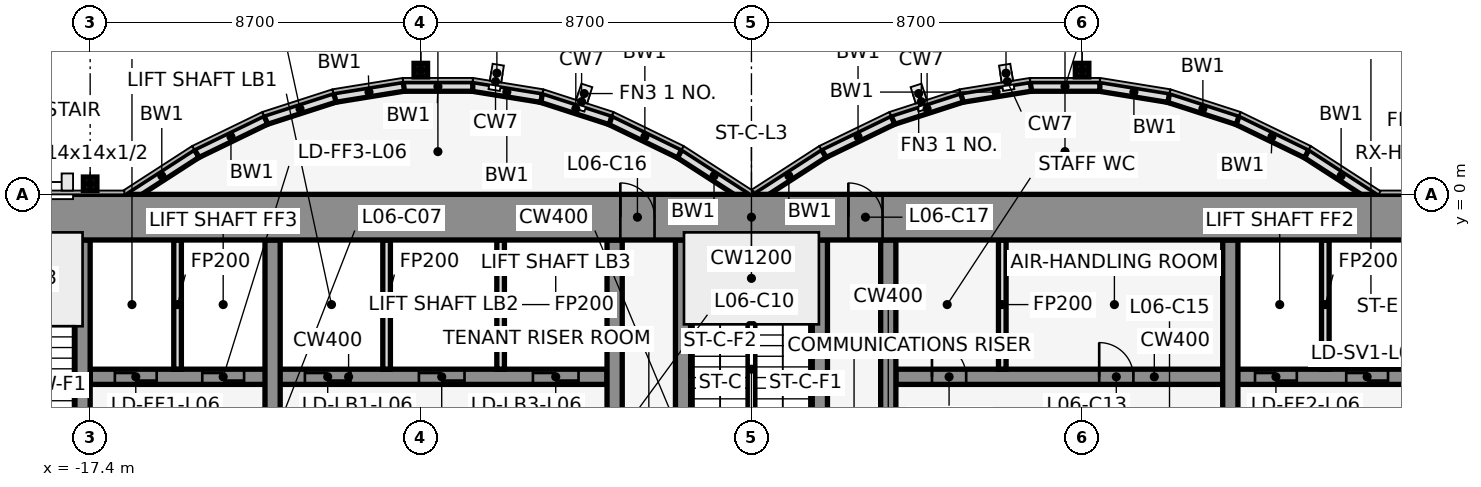
"""IFC4 building model, lengths in metres.
Left out: names, types, materials, properties, quantities, classifications, styles, units other than length and angle.
Written with IfcOpenShell. Run it as: python <this file> out.ifc"""

import sys

from ifc_helpers import new_model, si_unit, direction, frame, frame_2d, origin, origin_2d, place, context, subcontext, project, spatial, rectangle, hollow_rectangle, extrude, element, fill, save


model = new_model("IFC4")
c1 = context("Model", 3, precision=1e-05, world=origin(), true_north=direction((0.0, 1.0)))
c2 = subcontext(c1, "Body", "Model", "MODEL_VIEW")
j1 = project(units=[si_unit("LENGTHUNIT", "METRE"), si_unit("PLANEANGLEUNIT", "RADIAN")], contexts=[c1])
p1 = place(None, origin())
s1 = spatial("IfcSite", under=j1, at=p1, CompositionType="ELEMENT")
p2 = place(p1, origin())
s2 = spatial("IfcBuilding", under=s1, at=p2, CompositionType="ELEMENT")
p3 = place(p2, frame((0.0, 0.0, 35.0)))
s3 = spatial("IfcBuildingStorey", under=s2, at=p3, CompositionType="ELEMENT", Elevation=35.0)
for number, where, z_axis, x_axis in (
    (1, (-8.7, 3.269, 0.0), (0.0, 0.0, 1.0), (1.0, 0.0, 0.0)),
    (2, (-17.4, 0.278, 0.0), (0.0, 0.0, 1.0), (1.0, 0.0, 0.0)),
    (3, (8.7, 3.269, 0.0), (0.0, 0.0, 1.0), (1.0, 0.0, 0.0)),
):
    element("IfcColumn", number, at=place(p3, frame(where, z_axis=z_axis, x_axis=x_axis)), inside=s3, PredefinedType="COLUMN", context=c2, shape_type="SweptSolid", body=[
        extrude(hollow_rectangle(XDim=0.356, YDim=0.356, WallThickness=0.012, at=origin_2d()), origin(), (0.0, 0.0, 1.0), 4.5),
    ])
p4 = place(p3, frame((16.432, -0.105, 0.0), z_axis=(0.0, 0.0, 1.0), x_axis=(-0.83981312244, 0.542875602121, 0.0)))
e4 = element("IfcWall", 4, at=p4, inside=s3, PredefinedType="STANDARD", context=c2, shape_type="SweptSolid", body=[
    extrude(rectangle(XDim=2.183, YDim=0.25, at=frame_2d((1.091, 0.0))), origin(), (0.0, 0.0, 1.0), 4.35),
])
p5 = place(p3, frame((14.612, 1.073, 0.0), z_axis=(0.0, 0.0, 1.0), x_axis=(-0.89982408427, 0.436252928206, 0.0)))
e5 = element("IfcWall", 5, at=p5, inside=s3, PredefinedType="STANDARD", context=c2, shape_type="SweptSolid", body=[
    extrude(rectangle(XDim=2.038, YDim=0.25, at=frame_2d((1.019, 0.0))), origin(), (0.0, 0.0, 1.0), 4.35),
])
p6 = place(p3, frame((12.795, 1.955, 0.0), z_axis=(0.0, 0.0, 1.0), x_axis=(-0.951495806175, 0.307661714928, 0.0)))
e6 = element("IfcWall", 6, at=p6, inside=s3, PredefinedType="STANDARD", context=c2, shape_type="SweptSolid", body=[
    extrude(rectangle(XDim=1.927, YDim=0.25, at=frame_2d((0.963, 0.0))), origin(), (0.0, 0.0, 1.0), 4.35),
])
p7 = place(p3, frame((10.98, 2.543, 0.0), z_axis=(0.0, 0.0, 1.0), x_axis=(-0.987181718931, 0.159600293885, 0.0)))
e7 = element("IfcWall", 7, at=p7, inside=s3, PredefinedType="STANDARD", context=c2, shape_type="SweptSolid", body=[
    extrude(rectangle(XDim=1.857, YDim=0.25, at=frame_2d((0.929, 0.0))), origin(), (0.0, 0.0, 1.0), 4.35),
])
p8 = place(p3, frame((9.167, 2.838, 0.0), z_axis=(0.0, 0.0, 1.0), x_axis=(-1.0, 0.0, 0.0)))
e8 = element("IfcWall", 8, at=p8, inside=s3, PredefinedType="STANDARD", context=c2, shape_type="SweptSolid", body=[
    extrude(rectangle(XDim=1.833, YDim=0.25, at=frame_2d((0.917, 0.0))), origin(), (0.0, 0.0, 1.0), 4.35),
])
p9 = place(p3, frame((7.353, 2.84, 0.0), z_axis=(0.0, 0.0, 1.0), x_axis=(-0.987181718931, -0.159600293885, 0.0)))
e9 = element("IfcWall", 9, at=p9, inside=s3, PredefinedType="STANDARD", context=c2, shape_type="SweptSolid", body=[
    extrude(rectangle(XDim=1.857, YDim=0.25, at=frame_2d((0.929, 0.0))), origin(), (0.0, 0.0, 1.0), 4.35),
])
p10 = place(p3, frame((5.538, 2.548, 0.0), z_axis=(0.0, 0.0, 1.0), x_axis=(-0.951495806175, -0.307661714928, 0.0)))
e10 = element("IfcWall", 10, at=p10, inside=s3, PredefinedType="STANDARD", context=c2, shape_type="SweptSolid", body=[
    extrude(rectangle(XDim=1.927, YDim=0.25, at=frame_2d((0.963, 0.0))), origin(), (0.0, 0.0, 1.0), 4.35),
])
p11 = place(p3, frame((3.721, 1.962, 0.0), z_axis=(0.0, 0.0, 1.0), x_axis=(-0.89982408427, -0.436252928206, 0.0)))
e11 = element("IfcWall", 11, at=p11, inside=s3, PredefinedType="STANDARD", context=c2, shape_type="SweptSolid", body=[
    extrude(rectangle(XDim=2.038, YDim=0.25, at=frame_2d((1.019, 0.0))), origin(), (0.0, 0.0, 1.0), 4.35),
])
for number, where, z_axis, x_axis in (
    (12, (1.901, 1.08, 0.0), (0.0, 0.0, 1.0), (-0.84, -0.543, 0.0)),
    (13, (-0.068, -0.105, 0.0), (0.0, 0.0, 1.0), (-0.84, 0.543, 0.0)),
):
    element("IfcWall", number, at=place(p3, frame(where, z_axis=z_axis, x_axis=x_axis)), inside=s3, PredefinedType="STANDARD", context=c2, shape_type="SweptSolid", body=[
        extrude(rectangle(XDim=2.183, YDim=0.25, at=frame_2d((1.091, 0.0))), origin(), (0.0, 0.0, 1.0), 4.35),
    ])
p12 = place(p3, frame((-1.888, 1.073, 0.0), z_axis=(0.0, 0.0, 1.0), x_axis=(-0.89982408427, 0.436252928206, 0.0)))
e14 = element("IfcWall", 14, at=p12, inside=s3, PredefinedType="STANDARD", context=c2, shape_type="SweptSolid", body=[
    extrude(rectangle(XDim=2.038, YDim=0.25, at=frame_2d((1.019, 0.0))), origin(), (0.0, 0.0, 1.0), 4.35),
])
p13 = place(p3, frame((-3.705, 1.955, 0.0), z_axis=(0.0, 0.0, 1.0), x_axis=(-0.951495806175, 0.307661714928, 0.0)))
e15 = element("IfcWall", 15, at=p13, inside=s3, PredefinedType="STANDARD", context=c2, shape_type="SweptSolid", body=[
    extrude(rectangle(XDim=1.927, YDim=0.25, at=frame_2d((0.963, 0.0))), origin(), (0.0, 0.0, 1.0), 4.35),
])
p14 = place(p3, frame((-5.52, 2.543, 0.0), z_axis=(0.0, 0.0, 1.0), x_axis=(-0.987181718931, 0.159600293885, 0.0)))
e16 = element("IfcWall", 16, at=p14, inside=s3, PredefinedType="STANDARD", context=c2, shape_type="SweptSolid", body=[
    extrude(rectangle(XDim=1.857, YDim=0.25, at=frame_2d((0.929, 0.0))), origin(), (0.0, 0.0, 1.0), 4.35),
])
p15 = place(p3, frame((-7.333, 2.838, 0.0), z_axis=(0.0, 0.0, 1.0), x_axis=(-1.0, 0.0, 0.0)))
e17 = element("IfcWall", 17, at=p15, inside=s3, PredefinedType="STANDARD", context=c2, shape_type="SweptSolid", body=[
    extrude(rectangle(XDim=1.833, YDim=0.25, at=frame_2d((0.917, 0.0))), origin(), (0.0, 0.0, 1.0), 4.35),
])
p16 = place(p3, frame((-9.147, 2.84, 0.0), z_axis=(0.0, 0.0, 1.0), x_axis=(-0.987181718931, -0.159600293885, 0.0)))
e18 = element("IfcWall", 18, at=p16, inside=s3, PredefinedType="STANDARD", context=c2, shape_type="SweptSolid", body=[
    extrude(rectangle(XDim=1.857, YDim=0.25, at=frame_2d((0.929, 0.0))), origin(), (0.0, 0.0, 1.0), 4.35),
])
p17 = place(p3, frame((-10.962, 2.548, 0.0), z_axis=(0.0, 0.0, 1.0), x_axis=(-0.951495806175, -0.307661714928, 0.0)))
e19 = element("IfcWall", 19, at=p17, inside=s3, PredefinedType="STANDARD", context=c2, shape_type="SweptSolid", body=[
    extrude(rectangle(XDim=1.927, YDim=0.25, at=frame_2d((0.963, 0.0))), origin(), (0.0, 0.0, 1.0), 4.35),
])
p18 = place(p3, frame((-12.779, 1.962, 0.0), z_axis=(0.0, 0.0, 1.0), x_axis=(-0.89982408427, -0.436252928206, 0.0)))
e20 = element("IfcWall", 20, at=p18, inside=s3, PredefinedType="STANDARD", context=c2, shape_type="SweptSolid", body=[
    extrude(rectangle(XDim=2.038, YDim=0.25, at=frame_2d((1.019, 0.0))), origin(), (0.0, 0.0, 1.0), 4.35),
])
p19 = place(p3, frame((-14.599, 1.08, 0.0), z_axis=(0.0, 0.0, 1.0), x_axis=(-0.83981312244, -0.542875602121, 0.0)))
e21 = element("IfcWall", 21, at=p19, inside=s3, PredefinedType="STANDARD", context=c2, shape_type="SweptSolid", body=[
    extrude(rectangle(XDim=2.183, YDim=0.25, at=frame_2d((1.091, 0.0))), origin(), (0.0, 0.0, 1.0), 4.35),
])
p20 = place(p3, frame((-17.4, -4.8, 0.0), z_axis=(0.0, 0.0, 1.0), x_axis=(1.0, 0.0, 0.0)))
e22 = element("IfcWall", 22, at=p20, inside=s3, PredefinedType="SHEAR", context=c2, shape_type="SweptSolid", body=[
    extrude(rectangle(XDim=13.6, YDim=0.4, at=frame_2d((6.8, 0.0))), origin(), (0.0, 0.0, 1.0), 4.5),
])
p21 = place(p20, frame((0.65, 0.0, 0.0)))
e23 = element("IfcOpeningElement", 23, at=p21, cuts=e22, PredefinedType="OPENING", context=c2, shape_type="SweptSolid", body=[
    extrude(rectangle(XDim=1.1, YDim=2.1, at=frame_2d((0.55, 1.05))), frame((0.0, 0.212, 0.0), z_axis=(0.0, -1.0, 0.0), x_axis=(1.0, 0.0, 0.0)), (0.0, 0.0, 1.0), 0.424),
])
p22 = place(p20, frame((2.95, 0.0, 0.0)))
e24 = element("IfcOpeningElement", 24, at=p22, cuts=e22, PredefinedType="OPENING", context=c2, shape_type="SweptSolid", body=[
    extrude(rectangle(XDim=1.1, YDim=2.1, at=frame_2d((0.55, 1.05))), frame((0.0, 0.212, 0.0), z_axis=(0.0, -1.0, 0.0), x_axis=(1.0, 0.0, 0.0)), (0.0, 0.0, 1.0), 0.424),
])
p23 = place(p20, frame((5.65, 0.0, 0.0)))
e25 = element("IfcOpeningElement", 25, at=p23, cuts=e22, PredefinedType="OPENING", context=c2, shape_type="SweptSolid", body=[
    extrude(rectangle(XDim=1.2, YDim=2.1, at=frame_2d((0.6, 1.05))), frame((0.0, 0.212, 0.0), z_axis=(0.0, -1.0, 0.0), x_axis=(1.0, 0.0, 0.0)), (0.0, 0.0, 1.0), 0.424),
])
p24 = place(p20, frame((8.65, 0.0, 0.0)))
e26 = element("IfcOpeningElement", 26, at=p24, cuts=e22, PredefinedType="OPENING", context=c2, shape_type="SweptSolid", body=[
    extrude(rectangle(XDim=1.2, YDim=2.1, at=frame_2d((0.6, 1.05))), frame((0.0, 0.212, 0.0), z_axis=(0.0, -1.0, 0.0), x_axis=(1.0, 0.0, 0.0)), (0.0, 0.0, 1.0), 0.424),
])
p25 = place(p20, frame((11.65, 0.0, 0.0)))
e27 = element("IfcOpeningElement", 27, at=p25, cuts=e22, PredefinedType="OPENING", context=c2, shape_type="SweptSolid", body=[
    extrude(rectangle(XDim=1.2, YDim=2.1, at=frame_2d((0.6, 1.05))), frame((0.0, 0.212, 0.0), z_axis=(0.0, -1.0, 0.0), x_axis=(1.0, 0.0, 0.0)), (0.0, 0.0, 1.0), 0.424),
])
p26 = place(p3, frame((3.8, -4.8, 0.0), z_axis=(0.0, 0.0, 1.0), x_axis=(1.0, 0.0, 0.0)))
e28 = element("IfcWall", 28, at=p26, inside=s3, PredefinedType="SHEAR", context=c2, shape_type="SweptSolid", body=[
    extrude(rectangle(XDim=13.6, YDim=0.4, at=frame_2d((6.8, 0.0))), origin(), (0.0, 0.0, 1.0), 4.5),
])
p27 = place(p26, frame((9.45, 0.0, 0.0)))
e29 = element("IfcOpeningElement", 29, at=p27, cuts=e28, PredefinedType="OPENING", context=c2, shape_type="SweptSolid", body=[
    extrude(rectangle(XDim=1.1, YDim=2.1, at=frame_2d((0.55, 1.05))), frame((0.0, 0.212, 0.0), z_axis=(0.0, -1.0, 0.0), x_axis=(1.0, 0.0, 0.0)), (0.0, 0.0, 1.0), 0.424),
])
p28 = place(p26, frame((11.85, 0.0, 0.0)))
e30 = element("IfcOpeningElement", 30, at=p28, cuts=e28, PredefinedType="OPENING", context=c2, shape_type="SweptSolid", body=[
    extrude(rectangle(XDim=1.1, YDim=2.1, at=frame_2d((0.55, 1.05))), frame((0.0, 0.212, 0.0), z_axis=(0.0, -1.0, 0.0), x_axis=(1.0, 0.0, 0.0)), (0.0, 0.0, 1.0), 0.424),
])
p29 = place(p26, frame((0.95, 0.0, 0.0)))
e31 = element("IfcOpeningElement", 31, at=p29, cuts=e28, PredefinedType="OPENING", context=c2, shape_type="SweptSolid", body=[
    extrude(rectangle(XDim=0.9, YDim=2.1, at=frame_2d((0.45, 1.05))), frame((0.0, 0.212, 0.0), z_axis=(0.0, -1.0, 0.0), x_axis=(1.0, 0.0, 0.0)), (0.0, 0.0, 1.0), 0.424),
])
p30 = place(p26, frame((5.35, 0.0, 0.0)))
e32 = element("IfcOpeningElement", 32, at=p30, cuts=e28, PredefinedType="OPENING", context=c2, shape_type="SweptSolid", body=[
    extrude(rectangle(XDim=0.9, YDim=2.1, at=frame_2d((0.45, 1.05))), frame((0.0, 0.212, 0.0), z_axis=(0.0, -1.0, 0.0), x_axis=(1.0, 0.0, 0.0)), (0.0, 0.0, 1.0), 0.424),
])
p31 = place(p3, frame((-17.6, -11.8, 0.0), z_axis=(0.0, 0.0, 1.0), x_axis=(0.0, 1.0, 0.0)))
e33 = element("IfcWall", 33, at=p31, inside=s3, PredefinedType="SHEAR", context=c2, shape_type="SweptSolid", body=[
    extrude(rectangle(XDim=10.6, YDim=0.4, at=frame_2d((5.3, 0.0))), origin(), (0.0, 0.0, 1.0), 4.5),
])
p32 = place(p31, frame((1.25, 0.0, 0.0)))
e34 = element("IfcOpeningElement", 34, at=p32, cuts=e33, PredefinedType="OPENING", context=c2, shape_type="SweptSolid", body=[
    extrude(rectangle(XDim=1.1, YDim=2.1, at=frame_2d((0.55, 1.05))), frame((0.0, 0.212, 0.0), z_axis=(0.0, -1.0, 0.0), x_axis=(1.0, 0.0, 0.0)), (0.0, 0.0, 1.0), 0.424),
])
p33 = place(p31, frame((3.95, 0.0, 0.0)))
e35 = element("IfcOpeningElement", 35, at=p33, cuts=e33, PredefinedType="OPENING", context=c2, shape_type="SweptSolid", body=[
    extrude(rectangle(XDim=1.1, YDim=2.1, at=frame_2d((0.55, 1.05))), frame((0.0, 0.212, 0.0), z_axis=(0.0, -1.0, 0.0), x_axis=(1.0, 0.0, 0.0)), (0.0, 0.0, 1.0), 0.424),
])
p34 = place(p3, frame((-15.1, -4.6, 0.0), z_axis=(0.0, 0.0, 1.0), x_axis=(0.0, 1.0, 0.0)))
e36 = element("IfcWall", 36, at=p34, inside=s3, PredefinedType="PARTITIONING", context=c2, shape_type="SweptSolid", body=[
    extrude(rectangle(XDim=3.4, YDim=0.2, at=frame_2d((1.7, 0.0))), origin(), (0.0, 0.0, 1.0), 3.36),
])
p35 = place(p3, frame((-12.6, -11.8, 0.0), z_axis=(0.0, 0.0, 1.0), x_axis=(0.0, 1.0, 0.0)))
e37 = element("IfcWall", 37, at=p35, inside=s3, PredefinedType="SHEAR", context=c2, shape_type="SweptSolid", body=[
    extrude(rectangle(XDim=10.6, YDim=0.4, at=frame_2d((5.3, 0.0))), origin(), (0.0, 0.0, 1.0), 4.5),
])
p36 = place(p35, frame((4.75, 0.0, 0.0)))
e38 = element("IfcOpeningElement", 38, at=p36, cuts=e37, PredefinedType="OPENING", context=c2, shape_type="SweptSolid", body=[
    extrude(rectangle(XDim=1.1, YDim=2.1, at=frame_2d((0.55, 1.05))), frame((0.0, 0.212, 0.0), z_axis=(0.0, -1.0, 0.0), x_axis=(1.0, 0.0, 0.0)), (0.0, 0.0, 1.0), 0.424),
])
for number, where, z_axis, x_axis in (
    (39, (-9.6, -4.6, 0.0), (0.0, 0.0, 1.0), (0.0, 1.0, 0.0)),
    (40, (-6.6, -4.6, 0.0), (0.0, 0.0, 1.0), (0.0, 1.0, 0.0)),
):
    element("IfcWall", number, at=place(p3, frame(where, z_axis=z_axis, x_axis=x_axis)), inside=s3, PredefinedType="PARTITIONING", context=c2, shape_type="SweptSolid", body=[
        extrude(rectangle(XDim=3.4, YDim=0.2, at=frame_2d((1.7, 0.0))), origin(), (0.0, 0.0, 1.0), 3.36),
    ])
p37 = place(p3, frame((-3.6, -11.8, 0.0), z_axis=(0.0, 0.0, 1.0), x_axis=(0.0, 1.0, 0.0)))
e41 = element("IfcWall", 41, at=p37, inside=s3, PredefinedType="SHEAR", context=c2, shape_type="SweptSolid", body=[
    extrude(rectangle(XDim=10.6, YDim=0.4, at=frame_2d((5.3, 0.0))), origin(), (0.0, 0.0, 1.0), 4.5),
])
p38 = place(p37, frame((4.85, 0.0, 0.0)))
e42 = element("IfcOpeningElement", 42, at=p38, cuts=e41, PredefinedType="OPENING", context=c2, shape_type="SweptSolid", body=[
    extrude(rectangle(XDim=0.9, YDim=2.1, at=frame_2d((0.45, 1.05))), frame((0.0, 0.212, 0.0), z_axis=(0.0, -1.0, 0.0), x_axis=(1.0, 0.0, 0.0)), (0.0, 0.0, 1.0), 0.424),
])
for number, where, z_axis, x_axis in (
    (43, (-1.8, -11.8, 0.0), (0.0, 0.0, 1.0), (0.0, 1.0, 0.0)),
    (44, (1.8, -11.8, 0.0), (0.0, 0.0, 1.0), (0.0, 1.0, 0.0)),
):
    element("IfcWall", number, at=place(p3, frame(where, z_axis=z_axis, x_axis=x_axis)), inside=s3, PredefinedType="SHEAR", context=c2, shape_type="SweptSolid", body=[
        extrude(rectangle(XDim=10.6, YDim=0.4, at=frame_2d((5.3, 0.0))), origin(), (0.0, 0.0, 1.0), 4.5),
    ])
p39 = place(p3, frame((3.6, -11.8, 0.0), z_axis=(0.0, 0.0, 1.0), x_axis=(0.0, 1.0, 0.0)))
e45 = element("IfcWall", 45, at=p39, inside=s3, PredefinedType="SHEAR", context=c2, shape_type="SweptSolid", body=[
    extrude(rectangle(XDim=10.6, YDim=0.4, at=frame_2d((5.3, 0.0))), origin(), (0.0, 0.0, 1.0), 4.5),
])
p40 = place(p39, frame((1.35, 0.0, 0.0)))
e46 = element("IfcOpeningElement", 46, at=p40, cuts=e45, PredefinedType="OPENING", context=c2, shape_type="SweptSolid", body=[
    extrude(rectangle(XDim=0.9, YDim=2.1, at=frame_2d((0.45, 1.05))), frame((0.0, 0.212, 0.0), z_axis=(0.0, -1.0, 0.0), x_axis=(1.0, 0.0, 0.0)), (0.0, 0.0, 1.0), 0.424),
])
p41 = place(p3, frame((6.6, -4.6, 0.0), z_axis=(0.0, 0.0, 1.0), x_axis=(0.0, 1.0, 0.0)))
e47 = element("IfcWall", 47, at=p41, inside=s3, PredefinedType="PARTITIONING", context=c2, shape_type="SweptSolid", body=[
    extrude(rectangle(XDim=3.4, YDim=0.2, at=frame_2d((1.7, 0.0))), origin(), (0.0, 0.0, 1.0), 3.36),
])
p42 = place(p3, frame((12.6, -11.8, 0.0), z_axis=(0.0, 0.0, 1.0), x_axis=(0.0, 1.0, 0.0)))
e48 = element("IfcWall", 48, at=p42, inside=s3, PredefinedType="SHEAR", context=c2, shape_type="SweptSolid", body=[
    extrude(rectangle(XDim=10.6, YDim=0.4, at=frame_2d((5.3, 0.0))), origin(), (0.0, 0.0, 1.0), 4.5),
])
p43 = place(p42, frame((4.75, 0.0, 0.0)))
e49 = element("IfcOpeningElement", 49, at=p43, cuts=e48, PredefinedType="OPENING", context=c2, shape_type="SweptSolid", body=[
    extrude(rectangle(XDim=1.1, YDim=2.1, at=frame_2d((0.55, 1.05))), frame((0.0, 0.212, 0.0), z_axis=(0.0, -1.0, 0.0), x_axis=(1.0, 0.0, 0.0)), (0.0, 0.0, 1.0), 0.424),
])
p44 = place(p3, frame((15.1, -4.6, 0.0), z_axis=(0.0, 0.0, 1.0), x_axis=(0.0, 1.0, 0.0)))
e50 = element("IfcWall", 50, at=p44, inside=s3, PredefinedType="PARTITIONING", context=c2, shape_type="SweptSolid", body=[
    extrude(rectangle(XDim=3.4, YDim=0.2, at=frame_2d((1.7, 0.0))), origin(), (0.0, 0.0, 1.0), 3.36),
])
p45 = place(p3, frame((-22.0, -0.6, 0.0), z_axis=(0.0, 0.0, 1.0), x_axis=(1.0, 0.0, 0.0)))
e51 = element("IfcWall", 51, at=p45, inside=s3, PredefinedType="SHEAR", context=c2, shape_type="SweptSolid", body=[
    extrude(rectangle(XDim=44.0, YDim=1.2, at=frame_2d((22.0, 0.0))), origin(), (0.0, 0.0, 1.0), 4.5),
])
p46 = place(p45, frame((18.55, 0.0, 0.0)))
e52 = element("IfcOpeningElement", 52, at=p46, cuts=e51, PredefinedType="OPENING", context=c2, shape_type="SweptSolid", body=[
    extrude(rectangle(XDim=0.9, YDim=2.1, at=frame_2d((0.45, 1.05))), frame((0.0, 0.612, 0.0), z_axis=(0.0, -1.0, 0.0), x_axis=(1.0, 0.0, 0.0)), (0.0, 0.0, 1.0), 1.224),
])
p47 = place(p45, frame((24.55, 0.0, 0.0)))
e53 = element("IfcOpeningElement", 53, at=p47, cuts=e51, PredefinedType="OPENING", context=c2, shape_type="SweptSolid", body=[
    extrude(rectangle(XDim=0.9, YDim=2.1, at=frame_2d((0.45, 1.05))), frame((0.0, 0.612, 0.0), z_axis=(0.0, -1.0, 0.0), x_axis=(1.0, 0.0, 0.0)), (0.0, 0.0, 1.0), 1.224),
])
p48 = place(p21, origin())
e54 = element("IfcDoor", 54, at=p48, inside=s3, OperationType="DOUBLE_DOOR_SLIDING", PredefinedType="DOOR", context=c2, shape_type="SweptSolid", body=[
    extrude(rectangle(XDim=1.1, YDim=2.1, at=frame_2d((0.55, 1.05))), frame((0.0, 0.025, 0.0), z_axis=(0.0, -1.0, 0.0), x_axis=(1.0, 0.0, 0.0)), (0.0, 0.0, 1.0), 0.05),
])
fill(e23, e54)
p49 = place(p22, origin())
e55 = element("IfcDoor", 55, at=p49, inside=s3, OperationType="DOUBLE_DOOR_SLIDING", PredefinedType="DOOR", context=c2, shape_type="SweptSolid", body=[
    extrude(rectangle(XDim=1.1, YDim=2.1, at=frame_2d((0.55, 1.05))), frame((0.0, 0.025, 0.0), z_axis=(0.0, -1.0, 0.0), x_axis=(1.0, 0.0, 0.0)), (0.0, 0.0, 1.0), 0.05),
])
fill(e24, e55)
p50 = place(p23, origin())
e56 = element("IfcDoor", 56, at=p50, inside=s3, OperationType="DOUBLE_DOOR_SLIDING", PredefinedType="DOOR", context=c2, shape_type="SweptSolid", body=[
    extrude(rectangle(XDim=1.2, YDim=2.1, at=frame_2d((0.6, 1.05))), frame((0.0, 0.025, 0.0), z_axis=(0.0, -1.0, 0.0), x_axis=(1.0, 0.0, 0.0)), (0.0, 0.0, 1.0), 0.05),
])
fill(e25, e56)
p51 = place(p24, origin())
e57 = element("IfcDoor", 57, at=p51, inside=s3, OperationType="DOUBLE_DOOR_SLIDING", PredefinedType="DOOR", context=c2, shape_type="SweptSolid", body=[
    extrude(rectangle(XDim=1.2, YDim=2.1, at=frame_2d((0.6, 1.05))), frame((0.0, 0.025, 0.0), z_axis=(0.0, -1.0, 0.0), x_axis=(1.0, 0.0, 0.0)), (0.0, 0.0, 1.0), 0.05),
])
fill(e26, e57)
p52 = place(p25, origin())
e58 = element("IfcDoor", 58, at=p52, inside=s3, OperationType="DOUBLE_DOOR_SLIDING", PredefinedType="DOOR", context=c2, shape_type="SweptSolid", body=[
    extrude(rectangle(XDim=1.2, YDim=2.1, at=frame_2d((0.6, 1.05))), frame((0.0, 0.025, 0.0), z_axis=(0.0, -1.0, 0.0), x_axis=(1.0, 0.0, 0.0)), (0.0, 0.0, 1.0), 0.05),
])
fill(e27, e58)
p53 = place(p27, origin())
e59 = element("IfcDoor", 59, at=p53, inside=s3, OperationType="DOUBLE_DOOR_SLIDING", PredefinedType="DOOR", context=c2, shape_type="SweptSolid", body=[
    extrude(rectangle(XDim=1.1, YDim=2.1, at=frame_2d((0.55, 1.05))), frame((0.0, 0.025, 0.0), z_axis=(0.0, -1.0, 0.0), x_axis=(1.0, 0.0, 0.0)), (0.0, 0.0, 1.0), 0.05),
])
fill(e29, e59)
p54 = place(p28, origin())
e60 = element("IfcDoor", 60, at=p54, inside=s3, OperationType="DOUBLE_DOOR_SLIDING", PredefinedType="DOOR", context=c2, shape_type="SweptSolid", body=[
    extrude(rectangle(XDim=1.1, YDim=2.1, at=frame_2d((0.55, 1.05))), frame((0.0, 0.025, 0.0), z_axis=(0.0, -1.0, 0.0), x_axis=(1.0, 0.0, 0.0)), (0.0, 0.0, 1.0), 0.05),
])
fill(e30, e60)
p55 = place(p29, origin())
e61 = element("IfcDoor", 61, at=p55, inside=s3, OperationType="SINGLE_SWING_RIGHT", PredefinedType="DOOR", context=c2, shape_type="SweptSolid", body=[
    extrude(rectangle(XDim=0.9, YDim=2.1, at=frame_2d((0.45, 1.05))), frame((0.0, 0.025, 0.0), z_axis=(0.0, -1.0, 0.0), x_axis=(1.0, 0.0, 0.0)), (0.0, 0.0, 1.0), 0.05),
])
fill(e31, e61)
p56 = place(p30, origin())
e62 = element("IfcDoor", 62, at=p56, inside=s3, OperationType="SINGLE_SWING_LEFT", PredefinedType="DOOR", context=c2, shape_type="SweptSolid", body=[
    extrude(rectangle(XDim=0.9, YDim=2.1, at=frame_2d((0.45, 1.05))), frame((0.0, 0.025, 0.0), z_axis=(0.0, -1.0, 0.0), x_axis=(1.0, 0.0, 0.0)), (0.0, 0.0, 1.0), 0.05),
])
fill(e32, e62)
p57 = place(p46, origin())
e63 = element("IfcDoor", 63, at=p57, inside=s3, OperationType="SINGLE_SWING_LEFT", PredefinedType="DOOR", context=c2, shape_type="SweptSolid", body=[
    extrude(rectangle(XDim=0.9, YDim=2.1, at=frame_2d((0.45, 1.05))), frame((0.0, 0.025, 0.0), z_axis=(0.0, -1.0, 0.0), x_axis=(1.0, 0.0, 0.0)), (0.0, 0.0, 1.0), 0.05),
])
fill(e52, e63)
p58 = place(p47, origin())
e64 = element("IfcDoor", 64, at=p58, inside=s3, OperationType="SINGLE_SWING_LEFT", PredefinedType="DOOR", context=c2, shape_type="SweptSolid", body=[
    extrude(rectangle(XDim=0.9, YDim=2.1, at=frame_2d((0.45, 1.05))), frame((0.0, 0.025, 0.0), z_axis=(0.0, -1.0, 0.0), x_axis=(1.0, 0.0, 0.0)), (0.0, 0.0, 1.0), 0.05),
])
fill(e53, e64)
save(model, sys.argv[1])
